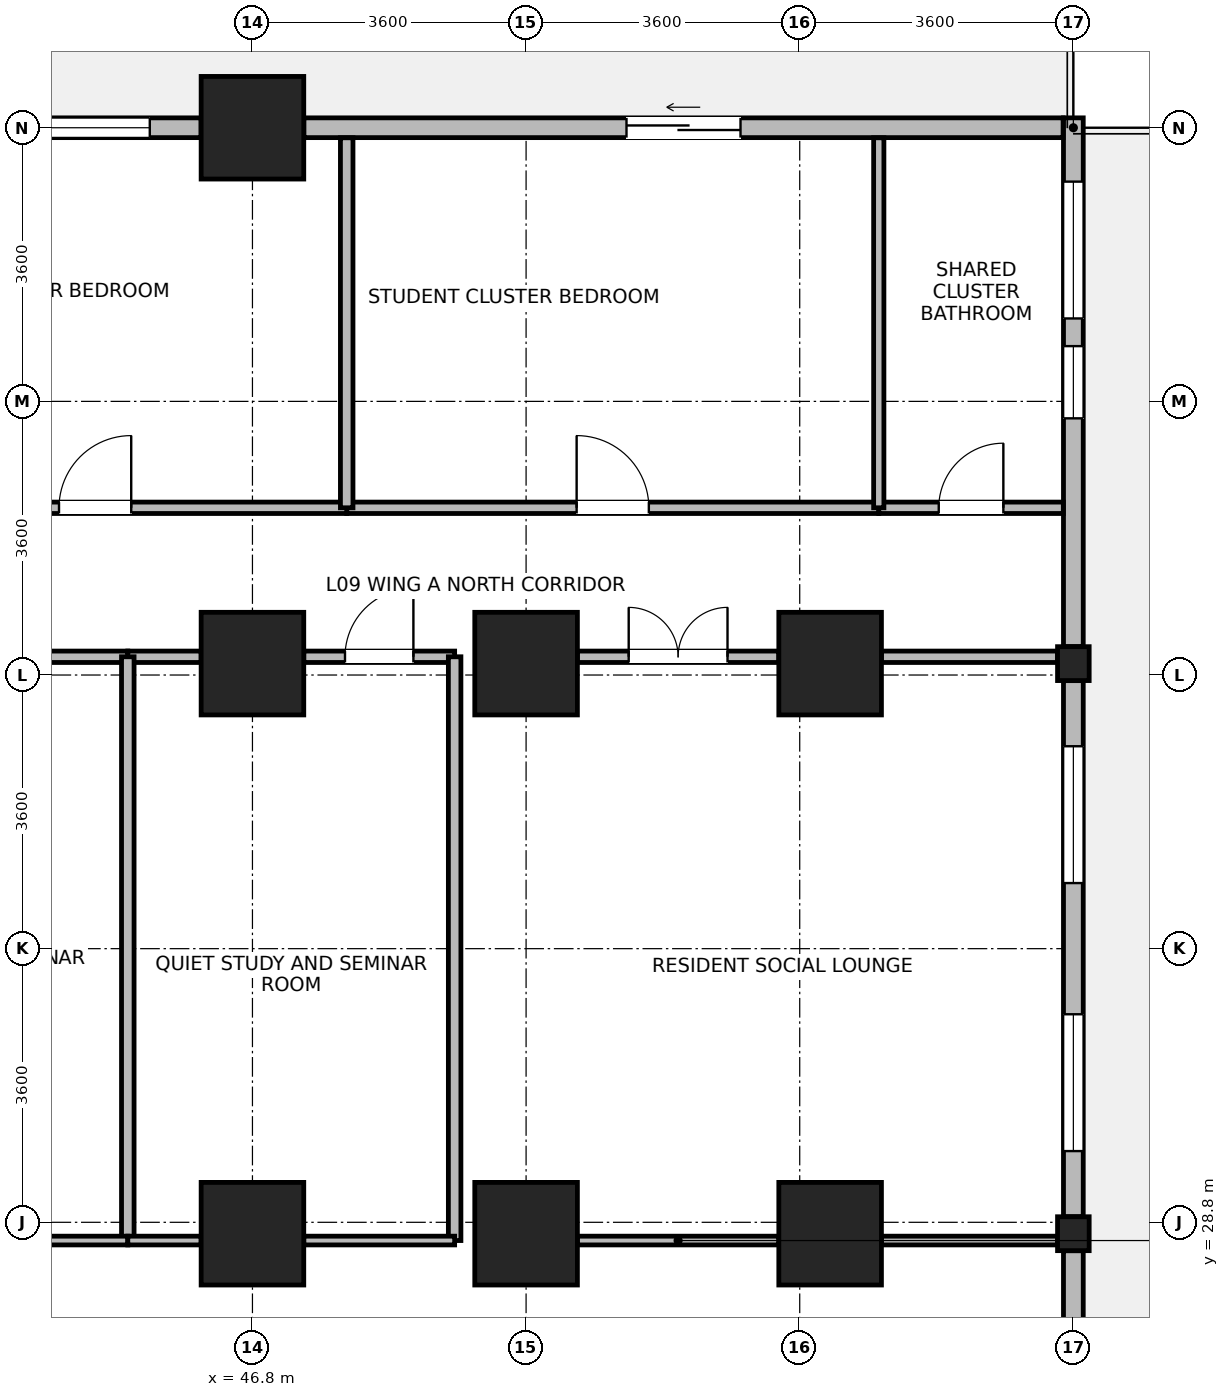
"""IFC4 building model, lengths in metres.
Left out: names, types, materials, properties, quantities, classifications, styles, units other than length and angle.
Written with IfcOpenShell. Run it as: python <this file> out.ifc"""

import sys

from ifc_helpers import new_model, si_unit, direction, frame, frame_2d, origin, origin_2d, place, context, subcontext, project, spatial, rectangle, i_section, extrude, source, transform, mapped, element, fill, save


model = new_model("IFC4")
c1 = context("Model", 3, precision=1e-05, world=origin(), true_north=direction((0.0, 1.0)))
c2 = subcontext(c1, "Body", "Model", "MODEL_VIEW")
j1 = project(units=[si_unit("LENGTHUNIT", "METRE"), si_unit("PLANEANGLEUNIT", "RADIAN")], contexts=[c1])
p1 = place(None, origin())
s1 = spatial("IfcSite", under=j1, at=p1, CompositionType="ELEMENT")
p2 = place(p1, origin())
s2 = spatial("IfcBuilding", under=s1, at=p2, CompositionType="ELEMENT")
p3 = place(p2, frame((0.0, 0.0, 40.1)))
s3 = spatial("IfcBuildingStorey", under=s2, at=p3, CompositionType="ELEMENT", Elevation=40.1)
m1 = source(origin(), c2, "Body", "SweptSolid", [
    extrude(rectangle(XDim=1.35, YDim=1.35, at=origin_2d()), origin(), (0.0, 0.0, 1.0), 3.7),
])
for number, where, z_axis, x_axis in (
    (1, (46.8, 28.65, 0.0), (0.0, 0.0, 1.0), (1.0, 0.0, 0.0)),
    (2, (46.8, 36.15, 0.0), (0.0, 0.0, 1.0), (1.0, 0.0, 0.0)),
    (3, (46.8, 43.2, 0.0), (0.0, 0.0, 1.0), (1.0, 0.0, 0.0)),
    (4, (50.4, 28.65, 0.0), (0.0, 0.0, 1.0), (1.0, 0.0, 0.0)),
    (5, (50.4, 36.15, 0.0), (0.0, 0.0, 1.0), (1.0, 0.0, 0.0)),
    (6, (54.4, 28.65, 0.0), (0.0, 0.0, 1.0), (1.0, 0.0, 0.0)),
    (7, (54.4, 36.15, 0.0), (0.0, 0.0, 1.0), (1.0, 0.0, 0.0)),
):
    element("IfcColumn", number, at=place(p3, frame(where, z_axis=z_axis, x_axis=x_axis)), inside=s3, PredefinedType="COLUMN", context=c2, shape_type="MappedRepresentation", body=[
        mapped(m1, transform((0.0, 0.0, 0.0), x_axis=(1.0, 0.0, 0.0), y_axis=(0.0, 1.0, 0.0), z_axis=(0.0, 0.0, 1.0), scale=1.0)),
    ])
m2 = source(origin(), c2, "Body", "SweptSolid", [
    extrude(i_section(OverallWidth=0.416, OverallDepth=0.446, WebThickness=0.029, FlangeThickness=0.04, FilletRadius=0.015, at=origin_2d()), origin(), (0.0, 0.0, 1.0), 3.7),
])
for number, where, z_axis, x_axis in (
    (8, (57.6, 28.65, 0.0), (0.0, 0.0, 1.0), (1.0, 0.0, 0.0)),
    (9, (57.6, 36.15, 0.0), (0.0, 0.0, 1.0), (1.0, 0.0, 0.0)),
):
    element("IfcColumn", number, at=place(p3, frame(where, z_axis=z_axis, x_axis=x_axis)), inside=s3, PredefinedType="COLUMN", context=c2, shape_type="MappedRepresentation", body=[
        mapped(m2, transform((0.0, 0.0, 0.0), x_axis=(1.0, 0.0, 0.0), y_axis=(0.0, 1.0, 0.0), z_axis=(0.0, 0.0, 1.0), scale=1.0)),
    ])
p4 = place(p3, frame((57.6, 28.426, 0.0), z_axis=(0.0, 0.0, 1.0), x_axis=(0.0, -1.0, 0.0)))
e10 = element("IfcWall", 10, at=p4, inside=s3, PredefinedType="STANDARD", context=c2, shape_type="SweptSolid", body=[
    extrude(rectangle(XDim=6.602, YDim=0.26, at=frame_2d((3.301, 0.0))), origin(), (0.0, 0.0, 1.0), 2.93),
])
p5 = place(p4, frame((4.052, 0.0, 0.85)))
e11 = element("IfcOpeningElement", 11, at=p5, cuts=e10, PredefinedType="OPENING", context=c2, shape_type="SweptSolid", body=[
    extrude(rectangle(XDim=1.8, YDim=1.85, at=frame_2d((0.9, 0.925))), frame((0.0, 0.14, 0.0), z_axis=(0.0, -1.0, 0.0), x_axis=(1.0, 0.0, 0.0)), (0.0, 0.0, 1.0), 0.28),
])
p6 = place(p4, frame((2.298, 0.0, 0.85)))
e12 = element("IfcOpeningElement", 12, at=p6, cuts=e10, PredefinedType="OPENING", context=c2, shape_type="SweptSolid", body=[
    extrude(rectangle(XDim=0.95, YDim=1.75, at=frame_2d((0.475, 0.875))), frame((0.0, 0.14, 0.0), z_axis=(0.0, -1.0, 0.0), x_axis=(1.0, 0.0, 0.0)), (0.0, 0.0, 1.0), 0.28),
])
p7 = place(p3, frame((57.6, 35.926, 0.0), z_axis=(0.0, 0.0, 1.0), x_axis=(0.0, -1.0, 0.0)))
e13 = element("IfcWall", 13, at=p7, inside=s3, PredefinedType="STANDARD", context=c2, shape_type="SweptSolid", body=[
    extrude(rectangle(XDim=7.052, YDim=0.26, at=frame_2d((3.526, 0.0))), origin(), (0.0, 0.0, 1.0), 2.93),
])
p8 = place(p7, frame((0.863, 0.0, 0.85)))
e14 = element("IfcOpeningElement", 14, at=p8, cuts=e13, PredefinedType="OPENING", context=c2, shape_type="SweptSolid", body=[
    extrude(rectangle(XDim=1.8, YDim=1.85, at=frame_2d((0.9, 0.925))), frame((0.0, 0.14, 0.0), z_axis=(0.0, -1.0, 0.0), x_axis=(1.0, 0.0, 0.0)), (0.0, 0.0, 1.0), 0.28),
])
p9 = place(p7, frame((4.389, 0.0, 0.85)))
e15 = element("IfcOpeningElement", 15, at=p9, cuts=e13, PredefinedType="OPENING", context=c2, shape_type="SweptSolid", body=[
    extrude(rectangle(XDim=1.8, YDim=1.85, at=frame_2d((0.9, 0.925))), frame((0.0, 0.14, 0.0), z_axis=(0.0, -1.0, 0.0), x_axis=(1.0, 0.0, 0.0)), (0.0, 0.0, 1.0), 0.28),
])
p10 = place(p3, frame((57.6, 43.33, 0.0), z_axis=(0.0, 0.0, 1.0), x_axis=(0.0, -1.0, 0.0)))
e16 = element("IfcWall", 16, at=p10, inside=s3, PredefinedType="STANDARD", context=c2, shape_type="SweptSolid", body=[
    extrude(rectangle(XDim=6.956, YDim=0.26, at=frame_2d((3.478, 0.0))), origin(), (0.0, 0.0, 1.0), 3.43),
])
p11 = place(p10, frame((0.839, 0.0, 0.85)))
e17 = element("IfcOpeningElement", 17, at=p11, cuts=e16, PredefinedType="OPENING", context=c2, shape_type="SweptSolid", body=[
    extrude(rectangle(XDim=1.8, YDim=1.85, at=frame_2d((0.9, 0.925))), frame((0.0, 0.14, 0.0), z_axis=(0.0, -1.0, 0.0), x_axis=(1.0, 0.0, 0.0)), (0.0, 0.0, 1.0), 0.28),
])
p12 = place(p10, frame((3.003, 0.0, 0.85)))
e18 = element("IfcOpeningElement", 18, at=p12, cuts=e16, PredefinedType="OPENING", context=c2, shape_type="SweptSolid", body=[
    extrude(rectangle(XDim=0.95, YDim=1.75, at=frame_2d((0.475, 0.875))), frame((0.0, 0.14, 0.0), z_axis=(0.0, -1.0, 0.0), x_axis=(1.0, 0.0, 0.0)), (0.0, 0.0, 1.0), 0.28),
])
p13 = place(p3, frame((47.476, 43.2, 0.0), z_axis=(0.0, 0.0, 1.0), x_axis=(1.0, 0.0, 0.0)))
e19 = element("IfcWall", 19, at=p13, inside=s3, PredefinedType="STANDARD", context=c2, shape_type="SweptSolid", body=[
    extrude(rectangle(XDim=9.989, YDim=0.26, at=frame_2d((4.995, 0.0))), origin(), (0.0, 0.0, 1.0), 3.43),
])
p14 = place(p13, frame((4.245, 0.0, 0.0)))
e20 = element("IfcOpeningElement", 20, at=p14, cuts=e19, PredefinedType="OPENING", context=c2, shape_type="SweptSolid", body=[
    extrude(rectangle(XDim=1.5, YDim=2.15, at=frame_2d((0.75, 1.075))), frame((0.0, 0.14, 0.0), z_axis=(0.0, -1.0, 0.0), x_axis=(1.0, 0.0, 0.0)), (0.0, 0.0, 1.0), 0.28),
])
p15 = place(p3, frame((36.676, 43.2, 0.0), z_axis=(0.0, 0.0, 1.0), x_axis=(1.0, 0.0, 0.0)))
e21 = element("IfcWall", 21, at=p15, inside=s3, PredefinedType="STANDARD", context=c2, shape_type="SweptSolid", body=[
    extrude(rectangle(XDim=9.448, YDim=0.26, at=frame_2d((4.724, 0.0))), origin(), (0.0, 0.0, 1.0), 2.93),
])
p16 = place(p15, frame((0.675, 0.0, 0.85)))
e22 = element("IfcOpeningElement", 22, at=p16, cuts=e21, PredefinedType="OPENING", context=c2, shape_type="SweptSolid", body=[
    extrude(rectangle(XDim=1.8, YDim=1.85, at=frame_2d((0.9, 0.925))), frame((0.0, 0.14, 0.0), z_axis=(0.0, -1.0, 0.0), x_axis=(1.0, 0.0, 0.0)), (0.0, 0.0, 1.0), 0.28),
])
p17 = place(p15, frame((6.973, 0.0, 0.85)))
e23 = element("IfcOpeningElement", 23, at=p17, cuts=e21, PredefinedType="OPENING", context=c2, shape_type="SweptSolid", body=[
    extrude(rectangle(XDim=1.8, YDim=1.85, at=frame_2d((0.9, 0.925))), frame((0.0, 0.14, 0.0), z_axis=(0.0, -1.0, 0.0), x_axis=(1.0, 0.0, 0.0)), (0.0, 0.0, 1.0), 0.28),
])
p18 = place(p3, frame((51.075, 36.24, 0.0), z_axis=(0.0, 0.0, 1.0), x_axis=(1.0, 0.0, 0.0)))
e24 = element("IfcWall", 24, at=p18, inside=s3, PredefinedType="PARTITIONING", context=c2, shape_type="SweptSolid", body=[
    extrude(rectangle(XDim=2.65, YDim=0.15, at=frame_2d((1.325, 0.0))), origin(), (0.0, 0.0, 1.0), 2.78),
])
p19 = place(p18, frame((0.675, 0.0, 0.0)))
e25 = element("IfcOpeningElement", 25, at=p19, cuts=e24, PredefinedType="OPENING", context=c2, shape_type="SweptSolid", body=[
    extrude(rectangle(XDim=1.3, YDim=2.12, at=frame_2d((0.65, 1.06))), frame((0.0, 0.085, 0.0), z_axis=(0.0, -1.0, 0.0), x_axis=(1.0, 0.0, 0.0)), (0.0, 0.0, 1.0), 0.17),
])
p20 = place(p3, frame((55.075, 36.24, 0.0), z_axis=(0.0, 0.0, 1.0), x_axis=(1.0, 0.0, 0.0)))
e26 = element("IfcWall", 26, at=p20, inside=s3, PredefinedType="PARTITIONING", context=c2, shape_type="SweptSolid", body=[
    extrude(rectangle(XDim=2.317, YDim=0.15, at=frame_2d((1.159, 0.0))), origin(), (0.0, 0.0, 1.0), 2.78),
])
p21 = place(p3, frame((48.04, 38.2, 0.0), z_axis=(0.0, 0.0, 1.0), x_axis=(1.0, 0.0, 0.0)))
e27 = element("IfcWall", 27, at=p21, inside=s3, PredefinedType="PARTITIONING", context=c2, shape_type="SweptSolid", body=[
    extrude(rectangle(XDim=7.0, YDim=0.15, at=frame_2d((3.5, 0.0))), origin(), (0.0, 0.0, 1.0), 3.43),
])
p22 = place(p21, frame((3.025, 0.0, 0.0)))
e28 = element("IfcOpeningElement", 28, at=p22, cuts=e27, PredefinedType="OPENING", context=c2, shape_type="SweptSolid", body=[
    extrude(rectangle(XDim=0.95, YDim=2.1, at=frame_2d((0.475, 1.05))), frame((0.0, 0.085, 0.0), z_axis=(0.0, -1.0, 0.0), x_axis=(1.0, 0.0, 0.0)), (0.0, 0.0, 1.0), 0.17),
])
p23 = place(p3, frame((41.42, 38.2, 0.0), z_axis=(0.0, 0.0, 1.0), x_axis=(1.0, 0.0, 0.0)))
e29 = element("IfcWall", 29, at=p23, inside=s3, PredefinedType="PARTITIONING", context=c2, shape_type="SweptSolid", body=[
    extrude(rectangle(XDim=6.62, YDim=0.15, at=frame_2d((3.31, 0.0))), origin(), (0.0, 0.0, 1.0), 3.43),
])
p24 = place(p23, frame((2.835, 0.0, 0.0)))
e30 = element("IfcOpeningElement", 30, at=p24, cuts=e29, PredefinedType="OPENING", context=c2, shape_type="SweptSolid", body=[
    extrude(rectangle(XDim=0.95, YDim=2.1, at=frame_2d((0.475, 1.05))), frame((0.0, 0.085, 0.0), z_axis=(0.0, -1.0, 0.0), x_axis=(1.0, 0.0, 0.0)), (0.0, 0.0, 1.0), 0.17),
])
p25 = place(p3, frame((40.44, 36.24, 0.0), z_axis=(0.0, 0.0, 1.0), x_axis=(1.0, 0.0, 0.0)))
e31 = element("IfcWall", 31, at=p25, inside=s3, PredefinedType="PARTITIONING", context=c2, shape_type="SweptSolid", body=[
    extrude(rectangle(XDim=4.72, YDim=0.15, at=frame_2d((2.36, 0.0))), origin(), (0.0, 0.0, 1.0), 2.78),
])
p26 = place(p25, frame((1.71, 0.0, 0.0)))
e32 = element("IfcOpeningElement", 32, at=p26, cuts=e31, PredefinedType="OPENING", context=c2, shape_type="SweptSolid", body=[
    extrude(rectangle(XDim=1.3, YDim=2.12, at=frame_2d((0.65, 1.06))), frame((0.0, 0.085, 0.0), z_axis=(0.0, -1.0, 0.0), x_axis=(1.0, 0.0, 0.0)), (0.0, 0.0, 1.0), 0.17),
])
p27 = place(p3, frame((45.16, 36.24, 0.0), z_axis=(0.0, 0.0, 1.0), x_axis=(1.0, 0.0, 0.0)))
e33 = element("IfcWall", 33, at=p27, inside=s3, PredefinedType="PARTITIONING", context=c2, shape_type="SweptSolid", body=[
    extrude(rectangle(XDim=0.965, YDim=0.15, at=frame_2d((0.482, 0.0))), origin(), (0.0, 0.0, 1.0), 2.78),
])
p28 = place(p3, frame((47.475, 36.24, 0.0), z_axis=(0.0, 0.0, 1.0), x_axis=(1.0, 0.0, 0.0)))
e34 = element("IfcWall", 34, at=p28, inside=s3, PredefinedType="PARTITIONING", context=c2, shape_type="SweptSolid", body=[
    extrude(rectangle(XDim=1.985, YDim=0.15, at=frame_2d((0.992, 0.0))), origin(), (0.0, 0.0, 1.0), 2.78),
])
p29 = place(p28, frame((0.542, 0.0, 0.0)))
e35 = element("IfcOpeningElement", 35, at=p29, cuts=e34, PredefinedType="OPENING", context=c2, shape_type="SweptSolid", body=[
    extrude(rectangle(XDim=0.9, YDim=2.08, at=frame_2d((0.45, 1.04))), frame((0.0, 0.085, 0.0), z_axis=(0.0, -1.0, 0.0), x_axis=(1.0, 0.0, 0.0)), (0.0, 0.0, 1.0), 0.17),
])
p30 = place(p3, frame((55.04, 38.2, 0.0), z_axis=(0.0, 0.0, 1.0), x_axis=(1.0, 0.0, 0.0)))
e36 = element("IfcWall", 36, at=p30, inside=s3, PredefinedType="PARTITIONING", context=c2, shape_type="SweptSolid", body=[
    extrude(rectangle(XDim=2.428, YDim=0.15, at=frame_2d((1.214, 0.0))), origin(), (0.0, 0.0, 1.0), 3.43),
])
p31 = place(p30, frame((0.789, 0.0, 0.0)))
e37 = element("IfcOpeningElement", 37, at=p31, cuts=e36, PredefinedType="OPENING", context=c2, shape_type="SweptSolid", body=[
    extrude(rectangle(XDim=0.85, YDim=2.04, at=frame_2d((0.425, 1.02))), frame((0.0, 0.085, 0.0), z_axis=(0.0, -1.0, 0.0), x_axis=(1.0, 0.0, 0.0)), (0.0, 0.0, 1.0), 0.17),
])
p32 = place(p3, frame((51.075, 28.56, 0.0), z_axis=(0.0, 0.0, 1.0), x_axis=(1.0, 0.0, 0.0)))
e38 = element("IfcWall", 38, at=p32, inside=s3, PredefinedType="PARTITIONING", context=c2, shape_type="SweptSolid", body=[
    extrude(rectangle(XDim=2.65, YDim=0.115, at=frame_2d((1.325, 0.0))), origin(), (0.0, 0.0, 1.0), 2.78),
])
p33 = place(p3, frame((55.075, 28.56, 0.0), z_axis=(0.0, 0.0, 1.0), x_axis=(1.0, 0.0, 0.0)))
e39 = element("IfcWall", 39, at=p33, inside=s3, PredefinedType="PARTITIONING", context=c2, shape_type="SweptSolid", body=[
    extrude(rectangle(XDim=2.317, YDim=0.115, at=frame_2d((1.159, 0.0))), origin(), (0.0, 0.0, 1.0), 2.78),
])
for number, where, z_axis, x_axis in (
    (40, (45.16, 28.56, 0.0), (0.0, 0.0, 1.0), (0.0, 1.0, 0.0)),
    (41, (49.46, 28.56, 0.0), (0.0, 0.0, 1.0), (0.0, 1.0, 0.0)),
):
    element("IfcWall", number, at=place(p3, frame(where, z_axis=z_axis, x_axis=x_axis)), inside=s3, PredefinedType="PARTITIONING", context=c2, shape_type="SweptSolid", body=[
        extrude(rectangle(XDim=7.68, YDim=0.165, at=frame_2d((3.84, 0.0))), origin(), (0.0, 0.0, 1.0), 3.43),
    ])
p34 = place(p3, frame((48.04, 38.2, 0.0), z_axis=(0.0, 0.0, 1.0), x_axis=(0.0, 1.0, 0.0)))
e42 = element("IfcWall", 42, at=p34, inside=s3, PredefinedType="PARTITIONING", context=c2, shape_type="SweptSolid", body=[
    extrude(rectangle(XDim=4.868, YDim=0.165, at=frame_2d((2.434, 0.0))), origin(), (0.0, 0.0, 1.0), 3.43),
])
p35 = place(p3, frame((55.04, 38.2, 0.0), z_axis=(0.0, 0.0, 1.0), x_axis=(0.0, 1.0, 0.0)))
e43 = element("IfcWall", 43, at=p35, inside=s3, PredefinedType="PARTITIONING", context=c2, shape_type="SweptSolid", body=[
    extrude(rectangle(XDim=4.868, YDim=0.135, at=frame_2d((2.434, 0.0))), origin(), (0.0, 0.0, 1.0), 3.43),
])
p36 = place(p3, frame((40.44, 28.56, 0.0), z_axis=(0.0, 0.0, 1.0), x_axis=(1.0, 0.0, 0.0)))
e44 = element("IfcWall", 44, at=p36, inside=s3, PredefinedType="PARTITIONING", context=c2, shape_type="SweptSolid", body=[
    extrude(rectangle(XDim=4.72, YDim=0.115, at=frame_2d((2.36, 0.0))), origin(), (0.0, 0.0, 1.0), 2.78),
])
p37 = place(p3, frame((45.16, 28.56, 0.0), z_axis=(0.0, 0.0, 1.0), x_axis=(1.0, 0.0, 0.0)))
e45 = element("IfcWall", 45, at=p37, inside=s3, PredefinedType="PARTITIONING", context=c2, shape_type="SweptSolid", body=[
    extrude(rectangle(XDim=0.965, YDim=0.115, at=frame_2d((0.482, 0.0))), origin(), (0.0, 0.0, 1.0), 2.78),
])
p38 = place(p3, frame((47.475, 28.56, 0.0), z_axis=(0.0, 0.0, 1.0), x_axis=(1.0, 0.0, 0.0)))
e46 = element("IfcWall", 46, at=p38, inside=s3, PredefinedType="PARTITIONING", context=c2, shape_type="SweptSolid", body=[
    extrude(rectangle(XDim=1.985, YDim=0.115, at=frame_2d((0.992, 0.0))), origin(), (0.0, 0.0, 1.0), 2.78),
])
p39 = place(p8, origin())
e47 = element("IfcWindow", 47, at=p39, inside=s3, PartitioningType="SINGLE_PANEL", PredefinedType="WINDOW", context=c2, shape_type="SweptSolid", body=[
    extrude(rectangle(XDim=1.8, YDim=1.85, at=frame_2d((0.9, 0.925))), frame((0.0, 0.03, 0.0), z_axis=(0.0, -1.0, 0.0), x_axis=(1.0, 0.0, 0.0)), (0.0, 0.0, 1.0), 0.06),
])
fill(e14, e47)
p40 = place(p9, origin())
e48 = element("IfcWindow", 48, at=p40, inside=s3, PartitioningType="SINGLE_PANEL", PredefinedType="WINDOW", context=c2, shape_type="SweptSolid", body=[
    extrude(rectangle(XDim=1.8, YDim=1.85, at=frame_2d((0.9, 0.925))), frame((0.0, 0.03, 0.0), z_axis=(0.0, -1.0, 0.0), x_axis=(1.0, 0.0, 0.0)), (0.0, 0.0, 1.0), 0.06),
])
fill(e15, e48)
p41 = place(p11, origin())
e49 = element("IfcWindow", 49, at=p41, inside=s3, PartitioningType="SINGLE_PANEL", PredefinedType="WINDOW", context=c2, shape_type="SweptSolid", body=[
    extrude(rectangle(XDim=1.8, YDim=1.85, at=frame_2d((0.9, 0.925))), frame((0.0, 0.03, 0.0), z_axis=(0.0, -1.0, 0.0), x_axis=(1.0, 0.0, 0.0)), (0.0, 0.0, 1.0), 0.06),
])
fill(e17, e49)
p42 = place(p12, origin())
e50 = element("IfcWindow", 50, at=p42, inside=s3, PartitioningType="SINGLE_PANEL", PredefinedType="WINDOW", context=c2, shape_type="SweptSolid", body=[
    extrude(rectangle(XDim=0.95, YDim=1.75, at=frame_2d((0.475, 0.875))), frame((0.0, 0.03, 0.0), z_axis=(0.0, -1.0, 0.0), x_axis=(1.0, 0.0, 0.0)), (0.0, 0.0, 1.0), 0.06),
])
fill(e18, e50)
p43 = place(p14, origin())
e51 = element("IfcDoor", 51, at=p43, inside=s3, OperationType="SLIDING_TO_LEFT", PredefinedType="DOOR", context=c2, shape_type="SweptSolid", body=[
    extrude(rectangle(XDim=1.5, YDim=2.15, at=frame_2d((0.75, 1.075))), frame((0.0, 0.025, 0.0), z_axis=(0.0, -1.0, 0.0), x_axis=(1.0, 0.0, 0.0)), (0.0, 0.0, 1.0), 0.05),
])
fill(e20, e51)
p44 = place(p17, origin())
e52 = element("IfcWindow", 52, at=p44, inside=s3, PartitioningType="SINGLE_PANEL", PredefinedType="WINDOW", context=c2, shape_type="SweptSolid", body=[
    extrude(rectangle(XDim=1.8, YDim=1.85, at=frame_2d((0.9, 0.925))), frame((0.0, 0.03, 0.0), z_axis=(0.0, -1.0, 0.0), x_axis=(1.0, 0.0, 0.0)), (0.0, 0.0, 1.0), 0.06),
])
fill(e23, e52)
p45 = place(p19, origin())
e53 = element("IfcDoor", 53, at=p45, inside=s3, OperationType="DOUBLE_DOOR_SINGLE_SWING", PredefinedType="DOOR", context=c2, shape_type="SweptSolid", body=[
    extrude(rectangle(XDim=1.3, YDim=2.12, at=frame_2d((0.65, 1.06))), frame((0.0, 0.025, 0.0), z_axis=(0.0, -1.0, 0.0), x_axis=(1.0, 0.0, 0.0)), (0.0, 0.0, 1.0), 0.05),
])
fill(e25, e53)
p46 = place(p22, origin())
e54 = element("IfcDoor", 54, at=p46, inside=s3, OperationType="SINGLE_SWING_LEFT", PredefinedType="DOOR", context=c2, shape_type="SweptSolid", body=[
    extrude(rectangle(XDim=0.95, YDim=2.1, at=frame_2d((0.475, 1.05))), frame((0.0, 0.025, 0.0), z_axis=(0.0, -1.0, 0.0), x_axis=(1.0, 0.0, 0.0)), (0.0, 0.0, 1.0), 0.05),
])
fill(e28, e54)
p47 = place(p24, origin())
e55 = element("IfcDoor", 55, at=p47, inside=s3, OperationType="SINGLE_SWING_RIGHT", PredefinedType="DOOR", context=c2, shape_type="SweptSolid", body=[
    extrude(rectangle(XDim=0.95, YDim=2.1, at=frame_2d((0.475, 1.05))), frame((0.0, 0.025, 0.0), z_axis=(0.0, -1.0, 0.0), x_axis=(1.0, 0.0, 0.0)), (0.0, 0.0, 1.0), 0.05),
])
fill(e30, e55)
p48 = place(p29, origin())
e56 = element("IfcDoor", 56, at=p48, inside=s3, OperationType="SINGLE_SWING_RIGHT", PredefinedType="DOOR", context=c2, shape_type="SweptSolid", body=[
    extrude(rectangle(XDim=0.9, YDim=2.08, at=frame_2d((0.45, 1.04))), frame((0.0, 0.025, 0.0), z_axis=(0.0, -1.0, 0.0), x_axis=(1.0, 0.0, 0.0)), (0.0, 0.0, 1.0), 0.05),
])
fill(e35, e56)
p49 = place(p31, origin())
e57 = element("IfcDoor", 57, at=p49, inside=s3, OperationType="SINGLE_SWING_RIGHT", PredefinedType="DOOR", context=c2, shape_type="SweptSolid", body=[
    extrude(rectangle(XDim=0.85, YDim=2.04, at=frame_2d((0.425, 1.02))), frame((0.0, 0.025, 0.0), z_axis=(0.0, -1.0, 0.0), x_axis=(1.0, 0.0, 0.0)), (0.0, 0.0, 1.0), 0.05),
])
fill(e37, e57)
save(model, sys.argv[1])
